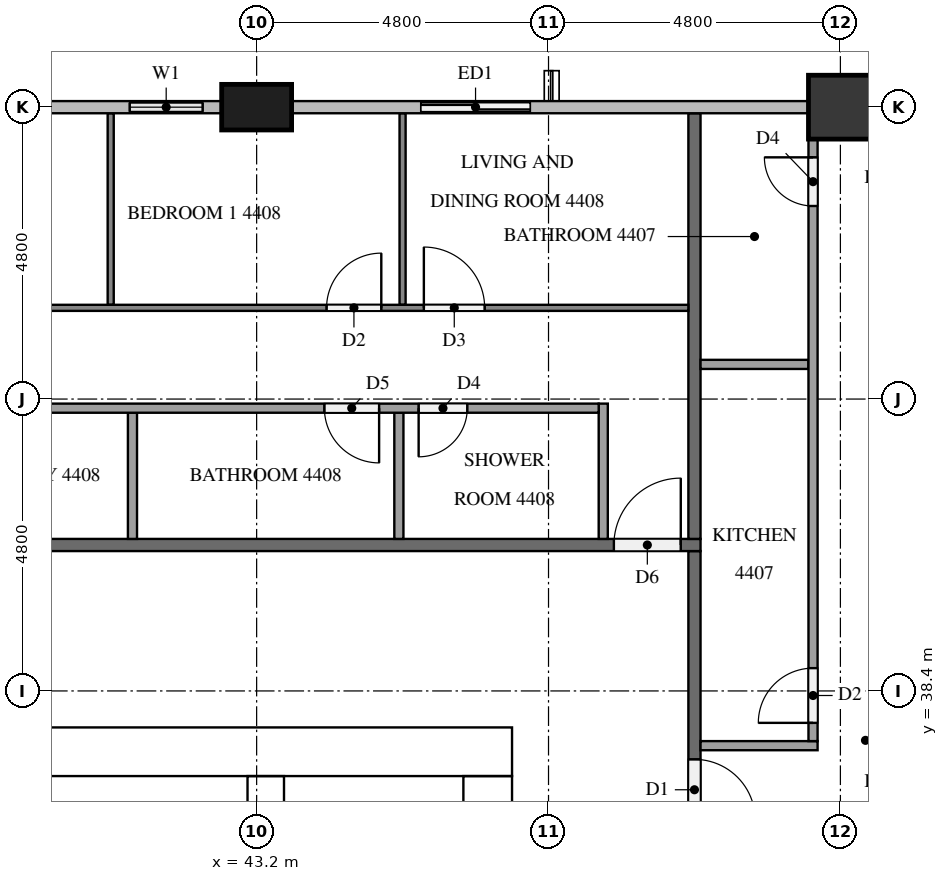
"""IFC4 building model, lengths in metres.
Left out: names, types, materials, properties, quantities, classifications, styles, units other than length and angle.
Written with IfcOpenShell. Run it as: python <this file> out.ifc"""

import sys

from ifc_helpers import new_model, si_unit, direction, frame, frame_2d, origin, origin_2d, place, context, subcontext, project, spatial, rectangle, extrude, element, fill, save


model = new_model("IFC4")
c1 = context("Model", 3, precision=1e-05, world=origin(), true_north=direction((0.0, 1.0)))
c2 = subcontext(c1, "Body", "Model", "MODEL_VIEW")
j1 = project(units=[si_unit("LENGTHUNIT", "METRE"), si_unit("PLANEANGLEUNIT", "RADIAN")], contexts=[c1])
p1 = place(None, origin())
s1 = spatial("IfcSite", under=j1, at=p1, CompositionType="ELEMENT")
p2 = place(p1, origin())
s2 = spatial("IfcBuilding", under=s1, at=p2, CompositionType="ELEMENT")
p3 = place(p2, frame((0.0, 0.0, 170.0)))
s3 = spatial("IfcBuildingStorey", under=s2, at=p3, CompositionType="ELEMENT", Elevation=170.0)
p4 = place(p3, frame((15.0, 37.4, 0.0), z_axis=(0.0, 0.0, 1.0), x_axis=(1.0, 0.0, 0.0)))
e1 = element("IfcWall", 1, at=p4, inside=s3, PredefinedType="SHEAR", context=c2, shape_type="SweptSolid", body=[
    extrude(rectangle(XDim=32.4, YDim=0.8, at=frame_2d((16.2, 0.0))), origin(), (0.0, 0.0, 1.0), 3.1),
])
p5 = place(p4, frame((15.3, 0.0, 0.0)))
e2 = element("IfcOpeningElement", 2, at=p5, cuts=e1, PredefinedType="OPENING", context=c2, shape_type="SweptSolid", body=[
    extrude(rectangle(XDim=1.8, YDim=2.1, at=frame_2d((0.9, 1.05))), frame((0.0, 0.41, 0.0), z_axis=(0.0, -1.0, 0.0), x_axis=(1.0, 0.0, 0.0)), (0.0, 0.0, 1.0), 0.82),
])
p6 = place(p4, frame((1.51, 0.0, 0.0)))
e3 = element("IfcOpeningElement", 3, at=p6, cuts=e1, PredefinedType="OPENING", context=c2, shape_type="SweptSolid", body=[
    extrude(rectangle(XDim=1.0, YDim=2.1, at=frame_2d((0.5, 1.05))), frame((0.0, 0.41, 0.0), z_axis=(0.0, -1.0, 0.0), x_axis=(1.0, 0.0, 0.0)), (0.0, 0.0, 1.0), 0.82),
])
p7 = place(p4, frame((5.11, 0.0, 0.0)))
e4 = element("IfcOpeningElement", 4, at=p7, cuts=e1, PredefinedType="OPENING", context=c2, shape_type="SweptSolid", body=[
    extrude(rectangle(XDim=1.0, YDim=2.1, at=frame_2d((0.5, 1.05))), frame((0.0, 0.41, 0.0), z_axis=(0.0, -1.0, 0.0), x_axis=(1.0, 0.0, 0.0)), (0.0, 0.0, 1.0), 0.82),
])
p8 = place(p3, frame((47.0, 15.8, 0.0), z_axis=(0.0, 0.0, 1.0), x_axis=(0.0, 1.0, 0.0)))
e5 = element("IfcWall", 5, at=p8, inside=s3, PredefinedType="SHEAR", context=c2, shape_type="SweptSolid", body=[
    extrude(rectangle(XDim=21.2, YDim=0.8, at=frame_2d((10.6, 0.0))), origin(), (0.0, 0.0, 1.0), 3.1),
])
p9 = place(p8, frame((10.3, 0.0, 0.0)))
e6 = element("IfcOpeningElement", 6, at=p9, cuts=e5, PredefinedType="OPENING", context=c2, shape_type="SweptSolid", body=[
    extrude(rectangle(XDim=1.2, YDim=2.1, at=frame_2d((0.6, 1.05))), frame((0.0, 0.41, 0.0), z_axis=(0.0, -1.0, 0.0), x_axis=(1.0, 0.0, 0.0)), (0.0, 0.0, 1.0), 0.82),
])
p10 = place(p3, frame((43.35, 27.75, 0.0), z_axis=(0.0, 0.0, 1.0), x_axis=(0.0, 1.0, 0.0)))
e7 = element("IfcWall", 7, at=p10, inside=s3, PredefinedType="SHEAR", context=c2, shape_type="SweptSolid", body=[
    extrude(rectangle(XDim=9.25, YDim=0.6, at=frame_2d((4.625, 0.0))), origin(), (0.0, 0.0, 1.0), 3.1),
])
p11 = place(p10, frame((7.65, 0.0, 0.0)))
e8 = element("IfcOpeningElement", 8, at=p11, cuts=e7, PredefinedType="OPENING", context=c2, shape_type="SweptSolid", body=[
    extrude(rectangle(XDim=1.2, YDim=2.1, at=frame_2d((0.6, 1.05))), frame((0.0, 0.31, 0.0), z_axis=(0.0, -1.0, 0.0), x_axis=(1.0, 0.0, 0.0)), (0.0, 0.0, 1.0), 0.62),
])
p12 = place(p3, frame((52.8, 48.0, 0.0), z_axis=(0.0, 0.0, 1.0), x_axis=(1.0, 0.0, 0.0)))
e9 = element("IfcColumn", 9, at=p12, inside=s3, PredefinedType="COLUMN", context=c2, shape_type="SweptSolid", body=[
    extrude(rectangle(XDim=1.05, YDim=1.05, at=origin_2d()), origin(), (0.0, 0.0, 1.0), 3.1),
])
p13 = place(p3, frame((43.2, 48.0, 0.0), z_axis=(0.0, 0.0, 1.0), x_axis=(1.0, 0.0, 0.0)))
e10 = element("IfcColumn", 10, at=p13, inside=s3, PredefinedType="COLUMN", context=c2, shape_type="SweptSolid", body=[
    extrude(rectangle(XDim=1.15, YDim=0.75, at=origin_2d()), origin(), (0.0, 0.0, 1.0), 3.1),
])
p14 = place(p3, frame((48.0, 48.0, 0.0), z_axis=(0.0, 0.0, 1.0), x_axis=(-1.0, 0.0, 0.0)))
e11 = element("IfcWall", 11, at=p14, inside=s3, PredefinedType="SOLIDWALL", context=c2, shape_type="SweptSolid", body=[
    extrude(rectangle(XDim=2.4, YDim=0.15, at=frame_2d((1.2, 0.0))), origin(), (0.0, 0.0, 1.0), 3.1),
])
p15 = place(p14, frame((0.3, 0.0, 0.0)))
e12 = element("IfcOpeningElement", 12, at=p15, cuts=e11, PredefinedType="OPENING", context=c2, shape_type="SweptSolid", body=[
    extrude(rectangle(XDim=1.8, YDim=2.4, at=frame_2d((0.9, 1.2))), frame((0.0, 0.085, 0.0), z_axis=(0.0, -1.0, 0.0), x_axis=(1.0, 0.0, 0.0)), (0.0, 0.0, 1.0), 0.17),
])
p16 = place(p3, frame((42.625, 48.0, 0.0), z_axis=(0.0, 0.0, 1.0), x_axis=(-1.0, 0.0, 0.0)))
e13 = element("IfcWall", 13, at=p16, inside=s3, PredefinedType="SOLIDWALL", context=c2, shape_type="SweptSolid", body=[
    extrude(rectangle(XDim=1.825, YDim=0.15, at=frame_2d((0.913, 0.0))), origin(), (0.0, 0.0, 1.0), 3.1),
])
p17 = place(p16, frame((0.312, 0.0, 0.9)))
e14 = element("IfcOpeningElement", 14, at=p17, cuts=e13, PredefinedType="OPENING", context=c2, shape_type="SweptSolid", body=[
    extrude(rectangle(XDim=1.2, YDim=1.4, at=frame_2d((0.6, 0.7))), frame((0.0, 0.085, 0.0), z_axis=(0.0, -1.0, 0.0), x_axis=(1.0, 0.0, 0.0)), (0.0, 0.0, 1.0), 0.17),
])
p18 = place(p3, frame((50.4, 40.7, 0.0), z_axis=(0.0, 0.0, 1.0), x_axis=(0.0, -1.0, 0.0)))
e15 = element("IfcWall", 15, at=p18, inside=s3, PredefinedType="PARTITIONING", context=c2, shape_type="SweptSolid", body=[
    extrude(rectangle(XDim=28.6, YDim=0.2, at=frame_2d((14.3, 0.0))), origin(), (0.0, 0.0, 1.0), 3.1),
])
p19 = place(p18, frame((26.575, 0.0, 0.0)))
e16 = element("IfcOpeningElement", 16, at=p19, cuts=e15, PredefinedType="OPENING", context=c2, shape_type="SweptSolid", body=[
    extrude(rectangle(XDim=1.0, YDim=2.1, at=frame_2d((0.5, 1.05))), frame((0.0, 0.11, 0.0), z_axis=(0.0, -1.0, 0.0), x_axis=(1.0, 0.0, 0.0)), (0.0, 0.0, 1.0), 0.22),
])
p20 = place(p18, frame((25.025, 0.0, 0.0)))
e17 = element("IfcOpeningElement", 17, at=p20, cuts=e15, PredefinedType="OPENING", context=c2, shape_type="SweptSolid", body=[
    extrude(rectangle(XDim=1.0, YDim=2.1, at=frame_2d((0.5, 1.05))), frame((0.0, 0.11, 0.0), z_axis=(0.0, -1.0, 0.0), x_axis=(1.0, 0.0, 0.0)), (0.0, 0.0, 1.0), 0.22),
])
p21 = place(p18, frame((4.975, 0.0, 0.0)))
e18 = element("IfcOpeningElement", 18, at=p21, cuts=e15, PredefinedType="OPENING", context=c2, shape_type="SweptSolid", body=[
    extrude(rectangle(XDim=1.0, YDim=2.1, at=frame_2d((0.5, 1.05))), frame((0.0, 0.11, 0.0), z_axis=(0.0, -1.0, 0.0), x_axis=(1.0, 0.0, 0.0)), (0.0, 0.0, 1.0), 0.22),
])
p22 = place(p18, frame((3.425, 0.0, 0.0)))
e19 = element("IfcOpeningElement", 19, at=p22, cuts=e15, PredefinedType="OPENING", context=c2, shape_type="SweptSolid", body=[
    extrude(rectangle(XDim=1.0, YDim=2.1, at=frame_2d((0.5, 1.05))), frame((0.0, 0.11, 0.0), z_axis=(0.0, -1.0, 0.0), x_axis=(1.0, 0.0, 0.0)), (0.0, 0.0, 1.0), 0.22),
])
p23 = place(p3, frame((11.9, 40.8, 0.0), z_axis=(0.0, 0.0, 1.0), x_axis=(1.0, 0.0, 0.0)))
e20 = element("IfcWall", 20, at=p23, inside=s3, PredefinedType="PARTITIONING", context=c2, shape_type="SweptSolid", body=[
    extrude(rectangle(XDim=38.6, YDim=0.2, at=frame_2d((19.3, 0.0))), origin(), (0.0, 0.0, 1.0), 3.1),
])
p24 = place(p23, frame((37.175, 0.0, 0.0)))
e21 = element("IfcOpeningElement", 21, at=p24, cuts=e20, PredefinedType="OPENING", context=c2, shape_type="SweptSolid", body=[
    extrude(rectangle(XDim=1.1, YDim=2.1, at=frame_2d((0.55, 1.05))), frame((0.0, 0.11, 0.0), z_axis=(0.0, -1.0, 0.0), x_axis=(1.0, 0.0, 0.0)), (0.0, 0.0, 1.0), 0.22),
])
p25 = place(p23, frame((18.025, 0.0, 0.0)))
e22 = element("IfcOpeningElement", 22, at=p25, cuts=e20, PredefinedType="OPENING", context=c2, shape_type="SweptSolid", body=[
    extrude(rectangle(XDim=1.0, YDim=2.1, at=frame_2d((0.5, 1.05))), frame((0.0, 0.11, 0.0), z_axis=(0.0, -1.0, 0.0), x_axis=(1.0, 0.0, 0.0)), (0.0, 0.0, 1.0), 0.22),
])
p26 = place(p23, frame((3.625, 0.0, 0.0)))
e23 = element("IfcOpeningElement", 23, at=p26, cuts=e20, PredefinedType="OPENING", context=c2, shape_type="SweptSolid", body=[
    extrude(rectangle(XDim=1.0, YDim=2.1, at=frame_2d((0.5, 1.05))), frame((0.0, 0.11, 0.0), z_axis=(0.0, -1.0, 0.0), x_axis=(1.0, 0.0, 0.0)), (0.0, 0.0, 1.0), 0.22),
])
p27 = place(p3, frame((50.4, 40.9, 0.0), z_axis=(0.0, 0.0, 1.0), x_axis=(0.0, 1.0, 0.0)))
e24 = element("IfcWall", 24, at=p27, inside=s3, PredefinedType="PARTITIONING", context=c2, shape_type="SweptSolid", body=[
    extrude(rectangle(XDim=7.0, YDim=0.2, at=frame_2d((3.5, 0.0))), origin(), (0.0, 0.0, 1.0), 3.1),
])
p28 = place(p3, frame((50.5, 43.77, 0.0), z_axis=(0.0, 0.0, 1.0), x_axis=(1.0, 0.0, 0.0)))
e25 = element("IfcWall", 25, at=p28, inside=s3, PredefinedType="PARTITIONING", context=c2, shape_type="SweptSolid", body=[
    extrude(rectangle(XDim=1.775, YDim=0.15, at=frame_2d((0.887, 0.0))), origin(), (0.0, 0.0, 1.0), 3.1),
])
p29 = place(p3, frame((50.5, 37.5, 0.0), z_axis=(0.0, 0.0, 1.0), x_axis=(1.0, 0.0, 0.0)))
e26 = element("IfcWall", 26, at=p29, inside=s3, PredefinedType="PARTITIONING", context=c2, shape_type="SweptSolid", body=[
    extrude(rectangle(XDim=1.925, YDim=0.15, at=frame_2d((0.962, 0.0))), origin(), (0.0, 0.0, 1.0), 3.1),
])
p30 = place(p3, frame((52.35, 37.575, 0.0), z_axis=(0.0, 0.0, 1.0), x_axis=(0.0, 1.0, 0.0)))
e27 = element("IfcWall", 27, at=p30, inside=s3, PredefinedType="PARTITIONING", context=c2, shape_type="SweptSolid", body=[
    extrude(rectangle(XDim=9.9, YDim=0.15, at=frame_2d((4.95, 0.0))), origin(), (0.0, 0.0, 1.0), 3.1),
])
p31 = place(p30, frame((0.3, 0.0, 0.0)))
e28 = element("IfcOpeningElement", 28, at=p31, cuts=e27, PredefinedType="OPENING", context=c2, shape_type="SweptSolid", body=[
    extrude(rectangle(XDim=0.9, YDim=2.1, at=frame_2d((0.45, 1.05))), frame((0.0, 0.085, 0.0), z_axis=(0.0, -1.0, 0.0), x_axis=(1.0, 0.0, 0.0)), (0.0, 0.0, 1.0), 0.17),
])
p32 = place(p30, frame((8.8, 0.0, 0.0)))
e29 = element("IfcOpeningElement", 29, at=p32, cuts=e27, PredefinedType="OPENING", context=c2, shape_type="SweptSolid", body=[
    extrude(rectangle(XDim=0.8, YDim=2.1, at=frame_2d((0.4, 1.05))), frame((0.0, 0.085, 0.0), z_axis=(0.0, -1.0, 0.0), x_axis=(1.0, 0.0, 0.0)), (0.0, 0.0, 1.0), 0.17),
])
for number, where, z_axis, x_axis in (
    (30, (45.6, 44.75, 0.0), (0.0, 0.0, 1.0), (0.0, 1.0, 0.0)),
    (31, (40.8, 44.75, 0.0), (0.0, 0.0, 1.0), (0.0, 1.0, 0.0)),
):
    element("IfcWall", number, at=place(p3, frame(where, z_axis=z_axis, x_axis=x_axis)), inside=s3, PredefinedType="PARTITIONING", context=c2, shape_type="SweptSolid", body=[
        extrude(rectangle(XDim=3.15, YDim=0.1, at=frame_2d((1.575, 0.0))), origin(), (0.0, 0.0, 1.0), 3.1),
    ])
p33 = place(p3, frame((31.3, 44.7, 0.0), z_axis=(0.0, 0.0, 1.0), x_axis=(1.0, 0.0, 0.0)))
e32 = element("IfcWall", 32, at=p33, inside=s3, PredefinedType="PARTITIONING", context=c2, shape_type="SweptSolid", body=[
    extrude(rectangle(XDim=19.0, YDim=0.1, at=frame_2d((9.5, 0.0))), origin(), (0.0, 0.0, 1.0), 3.1),
])
p34 = place(p33, frame((14.65, 0.0, 0.0)))
e33 = element("IfcOpeningElement", 33, at=p34, cuts=e32, PredefinedType="OPENING", context=c2, shape_type="SweptSolid", body=[
    extrude(rectangle(XDim=1.0, YDim=2.1, at=frame_2d((0.5, 1.05))), frame((0.0, 0.06, 0.0), z_axis=(0.0, -1.0, 0.0), x_axis=(1.0, 0.0, 0.0)), (0.0, 0.0, 1.0), 0.12),
])
p35 = place(p33, frame((13.05, 0.0, 0.0)))
e34 = element("IfcOpeningElement", 34, at=p35, cuts=e32, PredefinedType="OPENING", context=c2, shape_type="SweptSolid", body=[
    extrude(rectangle(XDim=0.9, YDim=2.1, at=frame_2d((0.45, 1.05))), frame((0.0, 0.06, 0.0), z_axis=(0.0, -1.0, 0.0), x_axis=(1.0, 0.0, 0.0)), (0.0, 0.0, 1.0), 0.12),
])
p36 = place(p33, frame((5.05, 0.0, 0.0)))
e35 = element("IfcOpeningElement", 35, at=p36, cuts=e32, PredefinedType="OPENING", context=c2, shape_type="SweptSolid", body=[
    extrude(rectangle(XDim=0.9, YDim=2.1, at=frame_2d((0.45, 1.05))), frame((0.0, 0.06, 0.0), z_axis=(0.0, -1.0, 0.0), x_axis=(1.0, 0.0, 0.0)), (0.0, 0.0, 1.0), 0.12),
])
p37 = place(p33, frame((3.45, 0.0, 0.0)))
e36 = element("IfcOpeningElement", 36, at=p37, cuts=e32, PredefinedType="OPENING", context=c2, shape_type="SweptSolid", body=[
    extrude(rectangle(XDim=0.9, YDim=2.1, at=frame_2d((0.45, 1.05))), frame((0.0, 0.06, 0.0), z_axis=(0.0, -1.0, 0.0), x_axis=(1.0, 0.0, 0.0)), (0.0, 0.0, 1.0), 0.12),
])
for number, where, z_axis, x_axis in (
    (37, (45.539, 40.9, 0.0), (0.0, 0.0, 1.0), (0.0, 1.0, 0.0)),
    (38, (41.158, 40.9, 0.0), (0.0, 0.0, 1.0), (0.0, 1.0, 0.0)),
):
    element("IfcWall", number, at=place(p3, frame(where, z_axis=z_axis, x_axis=x_axis)), inside=s3, PredefinedType="PARTITIONING", context=c2, shape_type="SweptSolid", body=[
        extrude(rectangle(XDim=2.075, YDim=0.15, at=frame_2d((1.038, 0.0))), origin(), (0.0, 0.0, 1.0), 3.1),
    ])
p38 = place(p3, frame((48.9, 40.9, 0.0), z_axis=(0.0, 0.0, 1.0), x_axis=(0.0, 1.0, 0.0)))
e39 = element("IfcWall", 39, at=p38, inside=s3, PredefinedType="PARTITIONING", context=c2, shape_type="SweptSolid", body=[
    extrude(rectangle(XDim=2.225, YDim=0.15, at=frame_2d((1.113, 0.0))), origin(), (0.0, 0.0, 1.0), 3.1),
])
p39 = place(p3, frame((48.825, 43.05, 0.0), z_axis=(0.0, 0.0, 1.0), x_axis=(-1.0, 0.0, 0.0)))
e40 = element("IfcWall", 40, at=p39, inside=s3, PredefinedType="PARTITIONING", context=c2, shape_type="SweptSolid", body=[
    extrude(rectangle(XDim=17.525, YDim=0.15, at=frame_2d((8.762, 0.0))), origin(), (0.0, 0.0, 1.0), 3.1),
])
p40 = place(p39, frame((2.161, 0.0, 0.0)))
e41 = element("IfcOpeningElement", 41, at=p40, cuts=e40, PredefinedType="OPENING", context=c2, shape_type="SweptSolid", body=[
    extrude(rectangle(XDim=0.8, YDim=2.1, at=frame_2d((0.4, 1.05))), frame((0.0, 0.085, 0.0), z_axis=(0.0, -1.0, 0.0), x_axis=(1.0, 0.0, 0.0)), (0.0, 0.0, 1.0), 0.17),
])
p41 = place(p39, frame((3.611, 0.0, 0.0)))
e42 = element("IfcOpeningElement", 42, at=p41, cuts=e40, PredefinedType="OPENING", context=c2, shape_type="SweptSolid", body=[
    extrude(rectangle(XDim=0.9, YDim=2.1, at=frame_2d((0.45, 1.05))), frame((0.0, 0.085, 0.0), z_axis=(0.0, -1.0, 0.0), x_axis=(1.0, 0.0, 0.0)), (0.0, 0.0, 1.0), 0.17),
])
p42 = place(p39, frame((9.828, 0.0, 0.0)))
e43 = element("IfcOpeningElement", 43, at=p42, cuts=e40, PredefinedType="OPENING", context=c2, shape_type="SweptSolid", body=[
    extrude(rectangle(XDim=0.8, YDim=2.1, at=frame_2d((0.4, 1.05))), frame((0.0, 0.085, 0.0), z_axis=(0.0, -1.0, 0.0), x_axis=(1.0, 0.0, 0.0)), (0.0, 0.0, 1.0), 0.17),
])
p43 = place(p39, frame((11.278, 0.0, 0.0)))
e44 = element("IfcOpeningElement", 44, at=p43, cuts=e40, PredefinedType="OPENING", context=c2, shape_type="SweptSolid", body=[
    extrude(rectangle(XDim=0.9, YDim=2.1, at=frame_2d((0.45, 1.05))), frame((0.0, 0.085, 0.0), z_axis=(0.0, -1.0, 0.0), x_axis=(1.0, 0.0, 0.0)), (0.0, 0.0, 1.0), 0.17),
])
p44 = place(p15, origin())
e45 = element("IfcDoor", 45, at=p44, inside=s3, OperationType="SLIDING_TO_RIGHT", PredefinedType="DOOR", context=c2, shape_type="SweptSolid", body=[
    extrude(rectangle(XDim=1.8, YDim=2.4, at=frame_2d((0.9, 1.2))), frame((0.0, 0.025, 0.0), z_axis=(0.0, -1.0, 0.0), x_axis=(1.0, 0.0, 0.0)), (0.0, 0.0, 1.0), 0.05),
])
fill(e12, e45)
p45 = place(p17, origin())
e46 = element("IfcWindow", 46, at=p45, inside=s3, PartitioningType="SINGLE_PANEL", PredefinedType="WINDOW", context=c2, shape_type="SweptSolid", body=[
    extrude(rectangle(XDim=1.2, YDim=1.4, at=frame_2d((0.6, 0.7))), frame((0.0, 0.03, 0.0), z_axis=(0.0, -1.0, 0.0), x_axis=(1.0, 0.0, 0.0)), (0.0, 0.0, 1.0), 0.06),
])
fill(e14, e46)
p46 = place(p11, origin())
e47 = element("IfcDoor", 47, at=p46, inside=s3, OperationType="SINGLE_SWING_RIGHT", PredefinedType="DOOR", context=c2, shape_type="SweptSolid", body=[
    extrude(rectangle(XDim=1.2, YDim=2.1, at=frame_2d((0.6, 1.05))), frame((0.0, 0.025, 0.0), z_axis=(0.0, -1.0, 0.0), x_axis=(1.0, 0.0, 0.0)), (0.0, 0.0, 1.0), 0.05),
])
fill(e8, e47)
p47 = place(p22, origin())
e48 = element("IfcDoor", 48, at=p47, inside=s3, OperationType="SINGLE_SWING_RIGHT", PredefinedType="DOOR", context=c2, shape_type="SweptSolid", body=[
    extrude(rectangle(XDim=1.0, YDim=2.1, at=frame_2d((0.5, 1.05))), frame((0.0, 0.025, 0.0), z_axis=(0.0, -1.0, 0.0), x_axis=(1.0, 0.0, 0.0)), (0.0, 0.0, 1.0), 0.05),
])
fill(e19, e48)
p48 = place(p24, origin())
e49 = element("IfcDoor", 49, at=p48, inside=s3, OperationType="SINGLE_SWING_RIGHT", PredefinedType="DOOR", context=c2, shape_type="SweptSolid", body=[
    extrude(rectangle(XDim=1.1, YDim=2.1, at=frame_2d((0.55, 1.05))), frame((0.0, 0.025, 0.0), z_axis=(0.0, -1.0, 0.0), x_axis=(1.0, 0.0, 0.0)), (0.0, 0.0, 1.0), 0.05),
])
fill(e21, e49)
p49 = place(p31, origin())
e50 = element("IfcDoor", 50, at=p49, inside=s3, OperationType="SINGLE_SWING_LEFT", PredefinedType="DOOR", context=c2, shape_type="SweptSolid", body=[
    extrude(rectangle(XDim=0.9, YDim=2.1, at=frame_2d((0.45, 1.05))), frame((0.0, 0.025, 0.0), z_axis=(0.0, -1.0, 0.0), x_axis=(1.0, 0.0, 0.0)), (0.0, 0.0, 1.0), 0.05),
])
fill(e28, e50)
p50 = place(p32, origin())
e51 = element("IfcDoor", 51, at=p50, inside=s3, OperationType="SINGLE_SWING_RIGHT", PredefinedType="DOOR", context=c2, shape_type="SweptSolid", body=[
    extrude(rectangle(XDim=0.8, YDim=2.1, at=frame_2d((0.4, 1.05))), frame((0.0, 0.025, 0.0), z_axis=(0.0, -1.0, 0.0), x_axis=(1.0, 0.0, 0.0)), (0.0, 0.0, 1.0), 0.05),
])
fill(e29, e51)
p51 = place(p34, origin())
e52 = element("IfcDoor", 52, at=p51, inside=s3, OperationType="SINGLE_SWING_LEFT", PredefinedType="DOOR", context=c2, shape_type="SweptSolid", body=[
    extrude(rectangle(XDim=1.0, YDim=2.1, at=frame_2d((0.5, 1.05))), frame((0.0, 0.025, 0.0), z_axis=(0.0, -1.0, 0.0), x_axis=(1.0, 0.0, 0.0)), (0.0, 0.0, 1.0), 0.05),
])
fill(e33, e52)
p52 = place(p35, origin())
e53 = element("IfcDoor", 53, at=p52, inside=s3, OperationType="SINGLE_SWING_RIGHT", PredefinedType="DOOR", context=c2, shape_type="SweptSolid", body=[
    extrude(rectangle(XDim=0.9, YDim=2.1, at=frame_2d((0.45, 1.05))), frame((0.0, 0.025, 0.0), z_axis=(0.0, -1.0, 0.0), x_axis=(1.0, 0.0, 0.0)), (0.0, 0.0, 1.0), 0.05),
])
fill(e34, e53)
p53 = place(p40, origin())
e54 = element("IfcDoor", 54, at=p53, inside=s3, OperationType="SINGLE_SWING_RIGHT", PredefinedType="DOOR", context=c2, shape_type="SweptSolid", body=[
    extrude(rectangle(XDim=0.8, YDim=2.1, at=frame_2d((0.4, 1.05))), frame((0.0, 0.025, 0.0), z_axis=(0.0, -1.0, 0.0), x_axis=(1.0, 0.0, 0.0)), (0.0, 0.0, 1.0), 0.05),
])
fill(e41, e54)
p54 = place(p41, origin())
e55 = element("IfcDoor", 55, at=p54, inside=s3, OperationType="SINGLE_SWING_LEFT", PredefinedType="DOOR", context=c2, shape_type="SweptSolid", body=[
    extrude(rectangle(XDim=0.9, YDim=2.1, at=frame_2d((0.45, 1.05))), frame((0.0, 0.025, 0.0), z_axis=(0.0, -1.0, 0.0), x_axis=(1.0, 0.0, 0.0)), (0.0, 0.0, 1.0), 0.05),
])
fill(e42, e55)
save(model, sys.argv[1])
